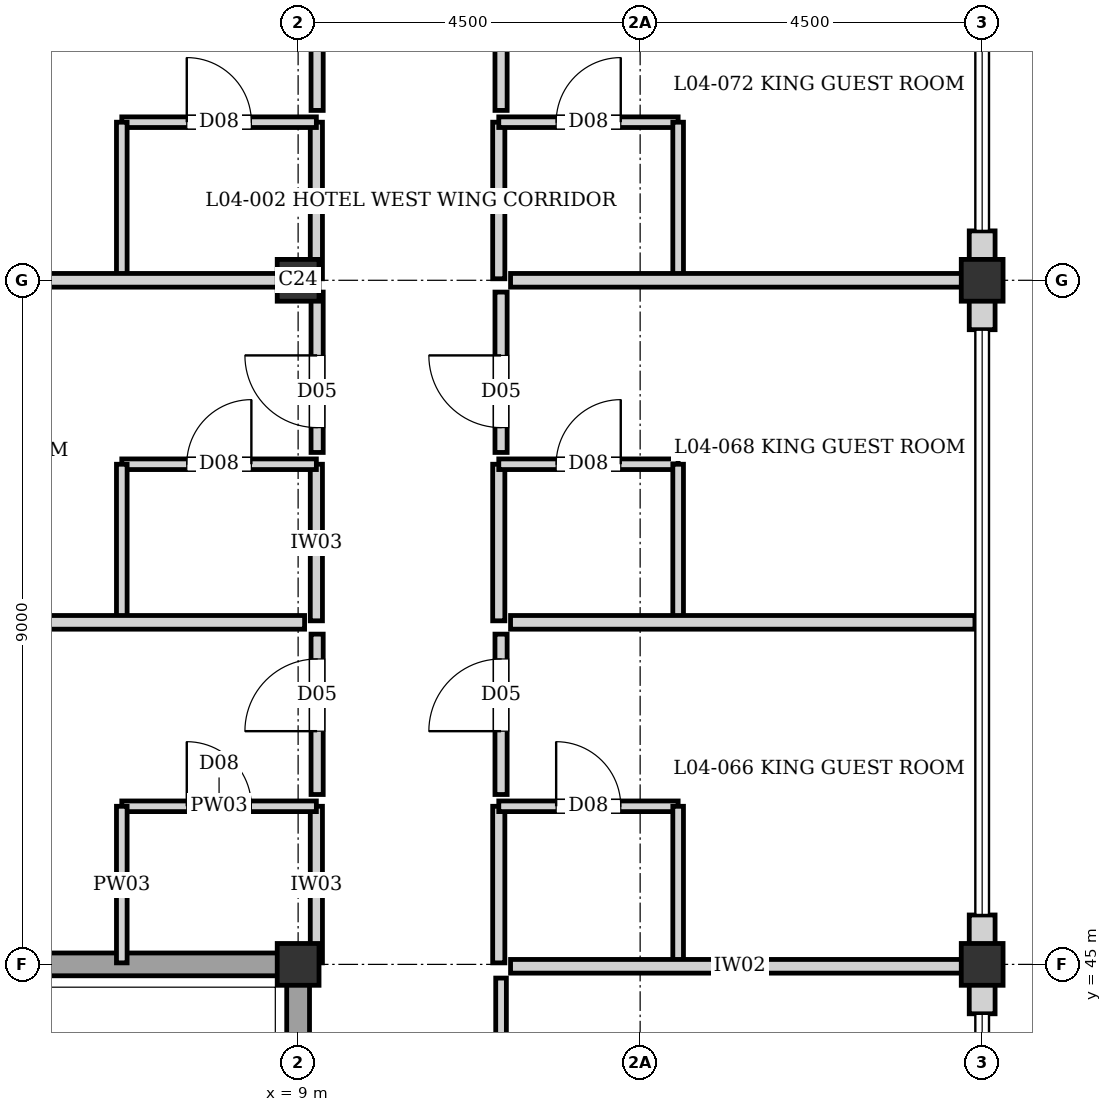
"""IFC4 building model, lengths in metres.
Left out: names, types, materials, properties, quantities, classifications, styles, units other than length and angle.
Written with IfcOpenShell. Run it as: python <this file> out.ifc"""

import sys

from ifc_helpers import new_model, si_unit, direction, frame, frame_2d, origin, origin_2d, place, context, subcontext, project, spatial, rectangle, extrude, element, fill, save


model = new_model("IFC4")
c1 = context("Model", 3, precision=1e-05, world=origin(), true_north=direction((0.0, 1.0)))
c2 = subcontext(c1, "Body", "Model", "MODEL_VIEW")
j1 = project(units=[si_unit("LENGTHUNIT", "METRE"), si_unit("PLANEANGLEUNIT", "RADIAN")], contexts=[c1])
p1 = place(None, origin())
s1 = spatial("IfcSite", under=j1, at=p1, CompositionType="ELEMENT")
p2 = place(p1, origin())
s2 = spatial("IfcBuilding", under=s1, at=p2, CompositionType="ELEMENT")
p3 = place(p2, frame((0.0, 0.0, 14.56)))
s3 = spatial("IfcBuildingStorey", under=s2, at=p3, CompositionType="ELEMENT", Elevation=14.56)
for number, where, z_axis, x_axis in (
    (1, (9.0, 45.0, 0.0), (0.0, 0.0, 1.0), (1.0, 0.0, 0.0)),
    (2, (9.0, 54.0, 0.0), (0.0, 0.0, 1.0), (1.0, 0.0, 0.0)),
    (3, (18.0, 45.0, 0.0), (0.0, 0.0, 1.0), (1.0, 0.0, 0.0)),
    (4, (18.0, 54.0, 0.0), (0.0, 0.0, 1.0), (1.0, 0.0, 0.0)),
):
    element("IfcColumn", number, at=place(p3, frame(where, z_axis=z_axis, x_axis=x_axis)), inside=s3, PredefinedType="COLUMN", context=c2, shape_type="SweptSolid", body=[
        extrude(rectangle(XDim=0.55, YDim=0.55, at=origin_2d()), origin(), (0.0, 0.0, 1.0), 3.04),
    ])
p4 = place(p3, frame((18.0, 54.65, 0.0), z_axis=(0.0, 0.0, 1.0), x_axis=(0.0, -1.0, 0.0)))
e5 = element("IfcWall", 5, at=p4, inside=s3, PredefinedType="SOLIDWALL", context=c2, shape_type="SweptSolid", body=[
    extrude(rectangle(XDim=0.65, YDim=0.34, at=frame_2d((0.325, 0.0))), origin(), (0.0, 0.0, 1.0), 2.48),
])
for number, where, z_axis, x_axis in (
    (6, (18.0, 54.0, 0.0), (0.0, 0.0, 1.0), (0.0, -1.0, 0.0)),
    (7, (18.0, 45.65, 0.0), (0.0, 0.0, 1.0), (0.0, -1.0, 0.0)),
):
    element("IfcWall", number, at=place(p3, frame(where, z_axis=z_axis, x_axis=x_axis)), inside=s3, PredefinedType="SOLIDWALL", context=c2, shape_type="SweptSolid", body=[
        extrude(rectangle(XDim=0.65, YDim=0.34, at=frame_2d((0.325, 0.0))), origin(), (0.0, 0.0, 1.0), 2.82),
    ])
p5 = place(p3, frame((18.0, 45.0, 0.0), z_axis=(0.0, 0.0, 1.0), x_axis=(0.0, -1.0, 0.0)))
e8 = element("IfcWall", 8, at=p5, inside=s3, PredefinedType="SOLIDWALL", context=c2, shape_type="SweptSolid", body=[
    extrude(rectangle(XDim=0.65, YDim=0.34, at=frame_2d((0.325, 0.0))), origin(), (0.0, 0.0, 1.0), 2.38),
])
p6 = place(p3, frame((9.0, 36.0, 0.0), z_axis=(0.0, 0.0, 1.0), x_axis=(0.0, 1.0, 0.0)))
e9 = element("IfcWall", 9, at=p6, inside=s3, PredefinedType="SHEAR", context=c2, shape_type="SweptSolid", body=[
    extrude(rectangle(XDim=9.0, YDim=0.3, at=frame_2d((4.5, 0.0))), origin(), (0.0, 0.0, 1.0), 2.82),
])
p7 = place(p6, frame((2.05, 0.0, 0.0)))
e10 = element("IfcOpeningElement", 10, at=p7, cuts=e9, PredefinedType="OPENING", context=c2, shape_type="SweptSolid", body=[
    extrude(rectangle(XDim=1.4, YDim=2.02, at=frame_2d((0.7, 1.01))), frame((0.0, 0.16, 0.0), z_axis=(0.0, -1.0, 0.0), x_axis=(1.0, 0.0, 0.0)), (0.0, 0.0, 1.0), 0.32),
])
p8 = place(p3, frame((0.0, 45.0, 0.0), z_axis=(0.0, 0.0, 1.0), x_axis=(1.0, 0.0, 0.0)))
e11 = element("IfcWall", 11, at=p8, inside=s3, PredefinedType="SHEAR", context=c2, shape_type="SweptSolid", body=[
    extrude(rectangle(XDim=9.0, YDim=0.3, at=frame_2d((4.5, 0.0))), origin(), (0.0, 0.0, 1.0), 2.82),
])
p9 = place(p3, frame((9.24, 45.02, 0.0), z_axis=(0.0, 0.0, 1.0), x_axis=(0.0, 1.0, 0.0)))
e12 = element("IfcWall", 12, at=p9, inside=s3, PredefinedType="PARTITIONING", context=c2, shape_type="SweptSolid", body=[
    extrude(rectangle(XDim=2.06, YDim=0.16, at=frame_2d((1.03, 0.0))), origin(), (0.0, 0.0, 1.0), 2.82),
])
p10 = place(p3, frame((6.68, 47.08, 0.0), z_axis=(0.0, 0.0, 1.0), x_axis=(1.0, 0.0, 0.0)))
e13 = element("IfcWall", 13, at=p10, inside=s3, PredefinedType="PLUMBINGWALL", context=c2, shape_type="SweptSolid", body=[
    extrude(rectangle(XDim=2.56, YDim=0.14, at=frame_2d((1.28, 0.0))), origin(), (0.0, 0.0, 1.0), 2.82),
])
p11 = place(p10, frame((0.855, 0.0, 0.0)))
e14 = element("IfcOpeningElement", 14, at=p11, cuts=e13, PredefinedType="OPENING", context=c2, shape_type="SweptSolid", body=[
    extrude(rectangle(XDim=0.85, YDim=2.04, at=frame_2d((0.425, 1.02))), frame((0.0, 0.08, 0.0), z_axis=(0.0, -1.0, 0.0), x_axis=(1.0, 0.0, 0.0)), (0.0, 0.0, 1.0), 0.16),
])
p12 = place(p3, frame((6.68, 45.02, 0.0), z_axis=(0.0, 0.0, 1.0), x_axis=(0.0, 1.0, 0.0)))
e15 = element("IfcWall", 15, at=p12, inside=s3, PredefinedType="PLUMBINGWALL", context=c2, shape_type="SweptSolid", body=[
    extrude(rectangle(XDim=2.06, YDim=0.14, at=frame_2d((1.03, 0.0))), origin(), (0.0, 0.0, 1.0), 2.82),
])
p13 = place(p3, frame((9.24, 49.52, 0.0), z_axis=(0.0, 0.0, 1.0), x_axis=(0.0, 1.0, 0.0)))
e16 = element("IfcWall", 16, at=p13, inside=s3, PredefinedType="PARTITIONING", context=c2, shape_type="SweptSolid", body=[
    extrude(rectangle(XDim=2.06, YDim=0.16, at=frame_2d((1.03, 0.0))), origin(), (0.0, 0.0, 1.0), 2.82),
])
p14 = place(p3, frame((6.68, 51.58, 0.0), z_axis=(0.0, 0.0, 1.0), x_axis=(1.0, 0.0, 0.0)))
e17 = element("IfcWall", 17, at=p14, inside=s3, PredefinedType="PLUMBINGWALL", context=c2, shape_type="SweptSolid", body=[
    extrude(rectangle(XDim=2.56, YDim=0.14, at=frame_2d((1.28, 0.0))), origin(), (0.0, 0.0, 1.0), 2.82),
])
p15 = place(p14, frame((0.855, 0.0, 0.0)))
e18 = element("IfcOpeningElement", 18, at=p15, cuts=e17, PredefinedType="OPENING", context=c2, shape_type="SweptSolid", body=[
    extrude(rectangle(XDim=0.85, YDim=2.04, at=frame_2d((0.425, 1.02))), frame((0.0, 0.08, 0.0), z_axis=(0.0, -1.0, 0.0), x_axis=(1.0, 0.0, 0.0)), (0.0, 0.0, 1.0), 0.16),
])
p16 = place(p3, frame((6.68, 49.52, 0.0), z_axis=(0.0, 0.0, 1.0), x_axis=(0.0, 1.0, 0.0)))
e19 = element("IfcWall", 19, at=p16, inside=s3, PredefinedType="PLUMBINGWALL", context=c2, shape_type="SweptSolid", body=[
    extrude(rectangle(XDim=2.06, YDim=0.14, at=frame_2d((1.03, 0.0))), origin(), (0.0, 0.0, 1.0), 2.82),
])
p17 = place(p3, frame((11.64, 45.02, 0.0), z_axis=(0.0, 0.0, 1.0), x_axis=(0.0, 1.0, 0.0)))
e20 = element("IfcWall", 20, at=p17, inside=s3, PredefinedType="PARTITIONING", context=c2, shape_type="SweptSolid", body=[
    extrude(rectangle(XDim=2.06, YDim=0.16, at=frame_2d((1.03, 0.0))), origin(), (0.0, 0.0, 1.0), 2.82),
])
p18 = place(p3, frame((11.64, 47.08, 0.0), z_axis=(0.0, 0.0, 1.0), x_axis=(1.0, 0.0, 0.0)))
e21 = element("IfcWall", 21, at=p18, inside=s3, PredefinedType="PLUMBINGWALL", context=c2, shape_type="SweptSolid", body=[
    extrude(rectangle(XDim=2.36, YDim=0.14, at=frame_2d((1.18, 0.0))), origin(), (0.0, 0.0, 1.0), 2.82),
])
p19 = place(p18, frame((0.755, 0.0, 0.0)))
e22 = element("IfcOpeningElement", 22, at=p19, cuts=e21, PredefinedType="OPENING", context=c2, shape_type="SweptSolid", body=[
    extrude(rectangle(XDim=0.85, YDim=2.04, at=frame_2d((0.425, 1.02))), frame((0.0, 0.08, 0.0), z_axis=(0.0, -1.0, 0.0), x_axis=(1.0, 0.0, 0.0)), (0.0, 0.0, 1.0), 0.16),
])
p20 = place(p3, frame((14.0, 45.02, 0.0), z_axis=(0.0, 0.0, 1.0), x_axis=(0.0, 1.0, 0.0)))
e23 = element("IfcWall", 23, at=p20, inside=s3, PredefinedType="PLUMBINGWALL", context=c2, shape_type="SweptSolid", body=[
    extrude(rectangle(XDim=2.06, YDim=0.14, at=frame_2d((1.03, 0.0))), origin(), (0.0, 0.0, 1.0), 2.82),
])
p21 = place(p3, frame((11.64, 49.52, 0.0), z_axis=(0.0, 0.0, 1.0), x_axis=(0.0, 1.0, 0.0)))
e24 = element("IfcWall", 24, at=p21, inside=s3, PredefinedType="PARTITIONING", context=c2, shape_type="SweptSolid", body=[
    extrude(rectangle(XDim=2.06, YDim=0.16, at=frame_2d((1.03, 0.0))), origin(), (0.0, 0.0, 1.0), 2.82),
])
p22 = place(p3, frame((11.64, 51.58, 0.0), z_axis=(0.0, 0.0, 1.0), x_axis=(1.0, 0.0, 0.0)))
e25 = element("IfcWall", 25, at=p22, inside=s3, PredefinedType="PLUMBINGWALL", context=c2, shape_type="SweptSolid", body=[
    extrude(rectangle(XDim=2.36, YDim=0.14, at=frame_2d((1.18, 0.0))), origin(), (0.0, 0.0, 1.0), 2.82),
])
p23 = place(p22, frame((0.755, 0.0, 0.0)))
e26 = element("IfcOpeningElement", 26, at=p23, cuts=e25, PredefinedType="OPENING", context=c2, shape_type="SweptSolid", body=[
    extrude(rectangle(XDim=0.85, YDim=2.04, at=frame_2d((0.425, 1.02))), frame((0.0, 0.08, 0.0), z_axis=(0.0, -1.0, 0.0), x_axis=(1.0, 0.0, 0.0)), (0.0, 0.0, 1.0), 0.16),
])
p24 = place(p3, frame((14.0, 49.52, 0.0), z_axis=(0.0, 0.0, 1.0), x_axis=(0.0, 1.0, 0.0)))
e27 = element("IfcWall", 27, at=p24, inside=s3, PredefinedType="PLUMBINGWALL", context=c2, shape_type="SweptSolid", body=[
    extrude(rectangle(XDim=2.06, YDim=0.14, at=frame_2d((1.03, 0.0))), origin(), (0.0, 0.0, 1.0), 2.82),
])
p25 = place(p3, frame((9.24, 54.02, 0.0), z_axis=(0.0, 0.0, 1.0), x_axis=(0.0, 1.0, 0.0)))
e28 = element("IfcWall", 28, at=p25, inside=s3, PredefinedType="PARTITIONING", context=c2, shape_type="SweptSolid", body=[
    extrude(rectangle(XDim=2.06, YDim=0.16, at=frame_2d((1.03, 0.0))), origin(), (0.0, 0.0, 1.0), 2.82),
])
p26 = place(p3, frame((6.68, 56.08, 0.0), z_axis=(0.0, 0.0, 1.0), x_axis=(1.0, 0.0, 0.0)))
e29 = element("IfcWall", 29, at=p26, inside=s3, PredefinedType="PLUMBINGWALL", context=c2, shape_type="SweptSolid", body=[
    extrude(rectangle(XDim=2.56, YDim=0.14, at=frame_2d((1.28, 0.0))), origin(), (0.0, 0.0, 1.0), 2.82),
])
p27 = place(p26, frame((0.855, 0.0, 0.0)))
e30 = element("IfcOpeningElement", 30, at=p27, cuts=e29, PredefinedType="OPENING", context=c2, shape_type="SweptSolid", body=[
    extrude(rectangle(XDim=0.85, YDim=2.04, at=frame_2d((0.425, 1.02))), frame((0.0, 0.08, 0.0), z_axis=(0.0, -1.0, 0.0), x_axis=(1.0, 0.0, 0.0)), (0.0, 0.0, 1.0), 0.16),
])
p28 = place(p3, frame((6.68, 54.02, 0.0), z_axis=(0.0, 0.0, 1.0), x_axis=(0.0, 1.0, 0.0)))
e31 = element("IfcWall", 31, at=p28, inside=s3, PredefinedType="PLUMBINGWALL", context=c2, shape_type="SweptSolid", body=[
    extrude(rectangle(XDim=2.06, YDim=0.14, at=frame_2d((1.03, 0.0))), origin(), (0.0, 0.0, 1.0), 2.82),
])
p29 = place(p3, frame((11.64, 54.02, 0.0), z_axis=(0.0, 0.0, 1.0), x_axis=(0.0, 1.0, 0.0)))
e32 = element("IfcWall", 32, at=p29, inside=s3, PredefinedType="PARTITIONING", context=c2, shape_type="SweptSolid", body=[
    extrude(rectangle(XDim=2.06, YDim=0.16, at=frame_2d((1.03, 0.0))), origin(), (0.0, 0.0, 1.0), 2.82),
])
p30 = place(p3, frame((11.64, 56.08, 0.0), z_axis=(0.0, 0.0, 1.0), x_axis=(1.0, 0.0, 0.0)))
e33 = element("IfcWall", 33, at=p30, inside=s3, PredefinedType="PLUMBINGWALL", context=c2, shape_type="SweptSolid", body=[
    extrude(rectangle(XDim=2.36, YDim=0.14, at=frame_2d((1.18, 0.0))), origin(), (0.0, 0.0, 1.0), 2.82),
])
p31 = place(p30, frame((0.755, 0.0, 0.0)))
e34 = element("IfcOpeningElement", 34, at=p31, cuts=e33, PredefinedType="OPENING", context=c2, shape_type="SweptSolid", body=[
    extrude(rectangle(XDim=0.85, YDim=2.04, at=frame_2d((0.425, 1.02))), frame((0.0, 0.08, 0.0), z_axis=(0.0, -1.0, 0.0), x_axis=(1.0, 0.0, 0.0)), (0.0, 0.0, 1.0), 0.16),
])
p32 = place(p3, frame((14.0, 54.02, 0.0), z_axis=(0.0, 0.0, 1.0), x_axis=(0.0, 1.0, 0.0)))
e35 = element("IfcWall", 35, at=p32, inside=s3, PredefinedType="PLUMBINGWALL", context=c2, shape_type="SweptSolid", body=[
    extrude(rectangle(XDim=2.06, YDim=0.14, at=frame_2d((1.03, 0.0))), origin(), (0.0, 0.0, 1.0), 2.82),
])
p33 = place(p3, frame((11.795, 44.975, 0.0), z_axis=(0.0, 0.0, 1.0), x_axis=(1.0, 0.0, 0.0)))
e36 = element("IfcWall", 36, at=p33, inside=s3, PredefinedType="PARTITIONING", context=c2, shape_type="SweptSolid", body=[
    extrude(rectangle(XDim=6.03, YDim=0.18, at=frame_2d((3.015, 0.0))), origin(), (0.0, 0.0, 1.0), 2.38),
])
p34 = place(p3, frame((0.195, 49.5, 0.0), z_axis=(0.0, 0.0, 1.0), x_axis=(1.0, 0.0, 0.0)))
e37 = element("IfcWall", 37, at=p34, inside=s3, PredefinedType="PARTITIONING", context=c2, shape_type="SweptSolid", body=[
    extrude(rectangle(XDim=8.89, YDim=0.18, at=frame_2d((4.445, 0.0))), origin(), (0.0, 0.0, 1.0), 2.82),
])
p35 = place(p3, frame((0.195, 54.0, 0.0), z_axis=(0.0, 0.0, 1.0), x_axis=(1.0, 0.0, 0.0)))
e38 = element("IfcWall", 38, at=p35, inside=s3, PredefinedType="PARTITIONING", context=c2, shape_type="SweptSolid", body=[
    extrude(rectangle(XDim=8.89, YDim=0.18, at=frame_2d((4.445, 0.0))), origin(), (0.0, 0.0, 1.0), 2.42),
])
p36 = place(p3, frame((11.795, 49.5, 0.0), z_axis=(0.0, 0.0, 1.0), x_axis=(1.0, 0.0, 0.0)))
e39 = element("IfcWall", 39, at=p36, inside=s3, PredefinedType="PARTITIONING", context=c2, shape_type="SweptSolid", body=[
    extrude(rectangle(XDim=6.11, YDim=0.18, at=frame_2d((3.055, 0.0))), origin(), (0.0, 0.0, 1.0), 2.82),
])
p37 = place(p3, frame((11.795, 54.0, 0.0), z_axis=(0.0, 0.0, 1.0), x_axis=(1.0, 0.0, 0.0)))
e40 = element("IfcWall", 40, at=p37, inside=s3, PredefinedType="PARTITIONING", context=c2, shape_type="SweptSolid", body=[
    extrude(rectangle(XDim=6.03, YDim=0.18, at=frame_2d((3.015, 0.0))), origin(), (0.0, 0.0, 1.0), 2.38),
])
p38 = place(p3, frame((11.67, 40.59, 0.0), z_axis=(0.0, 0.0, 1.0), x_axis=(0.0, 1.0, 0.0)))
e41 = element("IfcWall", 41, at=p38, inside=s3, PredefinedType="PLUMBINGWALL", context=c2, shape_type="SweptSolid", body=[
    extrude(rectangle(XDim=4.23, YDim=0.14, at=frame_2d((2.115, 0.0))), origin(), (0.0, 0.0, 1.0), 2.82),
])
p39 = place(p38, frame((1.157, 0.0, 0.0)))
e42 = element("IfcOpeningElement", 42, at=p39, cuts=e41, PredefinedType="OPENING", context=c2, shape_type="SweptSolid", body=[
    extrude(rectangle(XDim=0.9, YDim=2.1, at=frame_2d((0.45, 1.05))), frame((0.0, 0.08, 0.0), z_axis=(0.0, -1.0, 0.0), x_axis=(1.0, 0.0, 0.0)), (0.0, 0.0, 1.0), 0.16),
])
p40 = place(p3, frame((9.25, 47.235, 0.0), z_axis=(0.0, 0.0, 1.0), x_axis=(0.0, 1.0, 0.0)))
e43 = element("IfcWall", 43, at=p40, inside=s3, PredefinedType="PARTITIONING", context=c2, shape_type="SweptSolid", body=[
    extrude(rectangle(XDim=2.11, YDim=0.16, at=frame_2d((1.055, 0.0))), origin(), (0.0, 0.0, 1.0), 2.82),
])
p41 = place(p40, frame((0.833, 0.0, 0.0)))
e44 = element("IfcOpeningElement", 44, at=p41, cuts=e43, PredefinedType="OPENING", context=c2, shape_type="SweptSolid", body=[
    extrude(rectangle(XDim=0.95, YDim=2.15, at=frame_2d((0.475, 1.075))), frame((0.0, 0.09, 0.0), z_axis=(0.0, -1.0, 0.0), x_axis=(1.0, 0.0, 0.0)), (0.0, 0.0, 1.0), 0.18),
])
p42 = place(p3, frame((9.25, 51.735, 0.0), z_axis=(0.0, 0.0, 1.0), x_axis=(0.0, 1.0, 0.0)))
e45 = element("IfcWall", 45, at=p42, inside=s3, PredefinedType="PARTITIONING", context=c2, shape_type="SweptSolid", body=[
    extrude(rectangle(XDim=2.11, YDim=0.16, at=frame_2d((1.055, 0.0))), origin(), (0.0, 0.0, 1.0), 2.82),
])
p43 = place(p42, frame((0.327, 0.0, 0.0)))
e46 = element("IfcOpeningElement", 46, at=p43, cuts=e45, PredefinedType="OPENING", context=c2, shape_type="SweptSolid", body=[
    extrude(rectangle(XDim=0.95, YDim=2.15, at=frame_2d((0.475, 1.075))), frame((0.0, 0.09, 0.0), z_axis=(0.0, -1.0, 0.0), x_axis=(1.0, 0.0, 0.0)), (0.0, 0.0, 1.0), 0.18),
])
p44 = place(p3, frame((11.67, 47.235, 0.0), z_axis=(0.0, 0.0, 1.0), x_axis=(0.0, 1.0, 0.0)))
e47 = element("IfcWall", 47, at=p44, inside=s3, PredefinedType="PARTITIONING", context=c2, shape_type="SweptSolid", body=[
    extrude(rectangle(XDim=2.11, YDim=0.16, at=frame_2d((1.055, 0.0))), origin(), (0.0, 0.0, 1.0), 2.82),
])
p45 = place(p44, frame((0.833, 0.0, 0.0)))
e48 = element("IfcOpeningElement", 48, at=p45, cuts=e47, PredefinedType="OPENING", context=c2, shape_type="SweptSolid", body=[
    extrude(rectangle(XDim=0.95, YDim=2.15, at=frame_2d((0.475, 1.075))), frame((0.0, 0.09, 0.0), z_axis=(0.0, -1.0, 0.0), x_axis=(1.0, 0.0, 0.0)), (0.0, 0.0, 1.0), 0.18),
])
p46 = place(p3, frame((11.67, 51.735, 0.0), z_axis=(0.0, 0.0, 1.0), x_axis=(0.0, 1.0, 0.0)))
e49 = element("IfcWall", 49, at=p46, inside=s3, PredefinedType="PARTITIONING", context=c2, shape_type="SweptSolid", body=[
    extrude(rectangle(XDim=2.11, YDim=0.16, at=frame_2d((1.055, 0.0))), origin(), (0.0, 0.0, 1.0), 2.82),
])
p47 = place(p46, frame((0.327, 0.0, 0.0)))
e50 = element("IfcOpeningElement", 50, at=p47, cuts=e49, PredefinedType="OPENING", context=c2, shape_type="SweptSolid", body=[
    extrude(rectangle(XDim=0.95, YDim=2.15, at=frame_2d((0.475, 1.075))), frame((0.0, 0.09, 0.0), z_axis=(0.0, -1.0, 0.0), x_axis=(1.0, 0.0, 0.0)), (0.0, 0.0, 1.0), 0.18),
])
p48 = place(p3, frame((9.25, 56.235, 0.0), z_axis=(0.0, 0.0, 1.0), x_axis=(0.0, 1.0, 0.0)))
e51 = element("IfcWall", 51, at=p48, inside=s3, PredefinedType="PARTITIONING", context=c2, shape_type="SweptSolid", body=[
    extrude(rectangle(XDim=6.69, YDim=0.16, at=frame_2d((3.345, 0.0))), origin(), (0.0, 0.0, 1.0), 2.82),
])
p49 = place(p48, frame((1.75, 0.0, 0.0)))
e52 = element("IfcOpeningElement", 52, at=p49, cuts=e51, PredefinedType="OPENING", context=c2, shape_type="SweptSolid", body=[
    extrude(rectangle(XDim=1.3, YDim=2.25, at=frame_2d((0.65, 1.125))), frame((0.0, 0.09, 0.0), z_axis=(0.0, -1.0, 0.0), x_axis=(1.0, 0.0, 0.0)), (0.0, 0.0, 1.0), 0.18),
])
p50 = place(p3, frame((11.67, 56.235, 0.0), z_axis=(0.0, 0.0, 1.0), x_axis=(0.0, 1.0, 0.0)))
e53 = element("IfcWall", 53, at=p50, inside=s3, PredefinedType="PARTITIONING", context=c2, shape_type="SweptSolid", body=[
    extrude(rectangle(XDim=2.11, YDim=0.16, at=frame_2d((1.055, 0.0))), origin(), (0.0, 0.0, 1.0), 2.82),
])
p51 = place(p50, frame((0.833, 0.0, 0.0)))
e54 = element("IfcOpeningElement", 54, at=p51, cuts=e53, PredefinedType="OPENING", context=c2, shape_type="SweptSolid", body=[
    extrude(rectangle(XDim=0.95, YDim=2.15, at=frame_2d((0.475, 1.075))), frame((0.0, 0.09, 0.0), z_axis=(0.0, -1.0, 0.0), x_axis=(1.0, 0.0, 0.0)), (0.0, 0.0, 1.0), 0.18),
])
p52 = place(p11, origin())
e55 = element("IfcDoor", 55, at=p52, inside=s3, OperationType="SINGLE_SWING_LEFT", PredefinedType="DOOR", context=c2, shape_type="SweptSolid", body=[
    extrude(rectangle(XDim=0.85, YDim=2.04, at=frame_2d((0.425, 1.02))), frame((0.0, 0.025, 0.0), z_axis=(0.0, -1.0, 0.0), x_axis=(1.0, 0.0, 0.0)), (0.0, 0.0, 1.0), 0.05),
])
fill(e14, e55)
p53 = place(p15, origin())
e56 = element("IfcDoor", 56, at=p53, inside=s3, OperationType="SINGLE_SWING_RIGHT", PredefinedType="DOOR", context=c2, shape_type="SweptSolid", body=[
    extrude(rectangle(XDim=0.85, YDim=2.04, at=frame_2d((0.425, 1.02))), frame((0.0, 0.025, 0.0), z_axis=(0.0, -1.0, 0.0), x_axis=(1.0, 0.0, 0.0)), (0.0, 0.0, 1.0), 0.05),
])
fill(e18, e56)
p54 = place(p19, origin())
e57 = element("IfcDoor", 57, at=p54, inside=s3, OperationType="SINGLE_SWING_LEFT", PredefinedType="DOOR", context=c2, shape_type="SweptSolid", body=[
    extrude(rectangle(XDim=0.85, YDim=2.04, at=frame_2d((0.425, 1.02))), frame((0.0, 0.025, 0.0), z_axis=(0.0, -1.0, 0.0), x_axis=(1.0, 0.0, 0.0)), (0.0, 0.0, 1.0), 0.05),
])
fill(e22, e57)
p55 = place(p23, origin())
e58 = element("IfcDoor", 58, at=p55, inside=s3, OperationType="SINGLE_SWING_RIGHT", PredefinedType="DOOR", context=c2, shape_type="SweptSolid", body=[
    extrude(rectangle(XDim=0.85, YDim=2.04, at=frame_2d((0.425, 1.02))), frame((0.0, 0.025, 0.0), z_axis=(0.0, -1.0, 0.0), x_axis=(1.0, 0.0, 0.0)), (0.0, 0.0, 1.0), 0.05),
])
fill(e26, e58)
p56 = place(p27, origin())
e59 = element("IfcDoor", 59, at=p56, inside=s3, OperationType="SINGLE_SWING_LEFT", PredefinedType="DOOR", context=c2, shape_type="SweptSolid", body=[
    extrude(rectangle(XDim=0.85, YDim=2.04, at=frame_2d((0.425, 1.02))), frame((0.0, 0.025, 0.0), z_axis=(0.0, -1.0, 0.0), x_axis=(1.0, 0.0, 0.0)), (0.0, 0.0, 1.0), 0.05),
])
fill(e30, e59)
p57 = place(p31, origin())
e60 = element("IfcDoor", 60, at=p57, inside=s3, OperationType="SINGLE_SWING_RIGHT", PredefinedType="DOOR", context=c2, shape_type="SweptSolid", body=[
    extrude(rectangle(XDim=0.85, YDim=2.04, at=frame_2d((0.425, 1.02))), frame((0.0, 0.025, 0.0), z_axis=(0.0, -1.0, 0.0), x_axis=(1.0, 0.0, 0.0)), (0.0, 0.0, 1.0), 0.05),
])
fill(e34, e60)
p58 = place(p41, origin())
e61 = element("IfcDoor", 61, at=p58, inside=s3, OperationType="SINGLE_SWING_LEFT", PredefinedType="DOOR", context=c2, shape_type="SweptSolid", body=[
    extrude(rectangle(XDim=0.95, YDim=2.15, at=frame_2d((0.475, 1.075))), frame((0.0, 0.025, 0.0), z_axis=(0.0, -1.0, 0.0), x_axis=(1.0, 0.0, 0.0)), (0.0, 0.0, 1.0), 0.05),
])
fill(e44, e61)
p59 = place(p43, origin())
e62 = element("IfcDoor", 62, at=p59, inside=s3, OperationType="SINGLE_SWING_RIGHT", PredefinedType="DOOR", context=c2, shape_type="SweptSolid", body=[
    extrude(rectangle(XDim=0.95, YDim=2.15, at=frame_2d((0.475, 1.075))), frame((0.0, 0.025, 0.0), z_axis=(0.0, -1.0, 0.0), x_axis=(1.0, 0.0, 0.0)), (0.0, 0.0, 1.0), 0.05),
])
fill(e46, e62)
p60 = place(p45, origin())
e63 = element("IfcDoor", 63, at=p60, inside=s3, OperationType="SINGLE_SWING_LEFT", PredefinedType="DOOR", context=c2, shape_type="SweptSolid", body=[
    extrude(rectangle(XDim=0.95, YDim=2.15, at=frame_2d((0.475, 1.075))), frame((0.0, 0.025, 0.0), z_axis=(0.0, -1.0, 0.0), x_axis=(1.0, 0.0, 0.0)), (0.0, 0.0, 1.0), 0.05),
])
fill(e48, e63)
p61 = place(p47, origin())
e64 = element("IfcDoor", 64, at=p61, inside=s3, OperationType="SINGLE_SWING_RIGHT", PredefinedType="DOOR", context=c2, shape_type="SweptSolid", body=[
    extrude(rectangle(XDim=0.95, YDim=2.15, at=frame_2d((0.475, 1.075))), frame((0.0, 0.025, 0.0), z_axis=(0.0, -1.0, 0.0), x_axis=(1.0, 0.0, 0.0)), (0.0, 0.0, 1.0), 0.05),
])
fill(e50, e64)
save(model, sys.argv[1])
